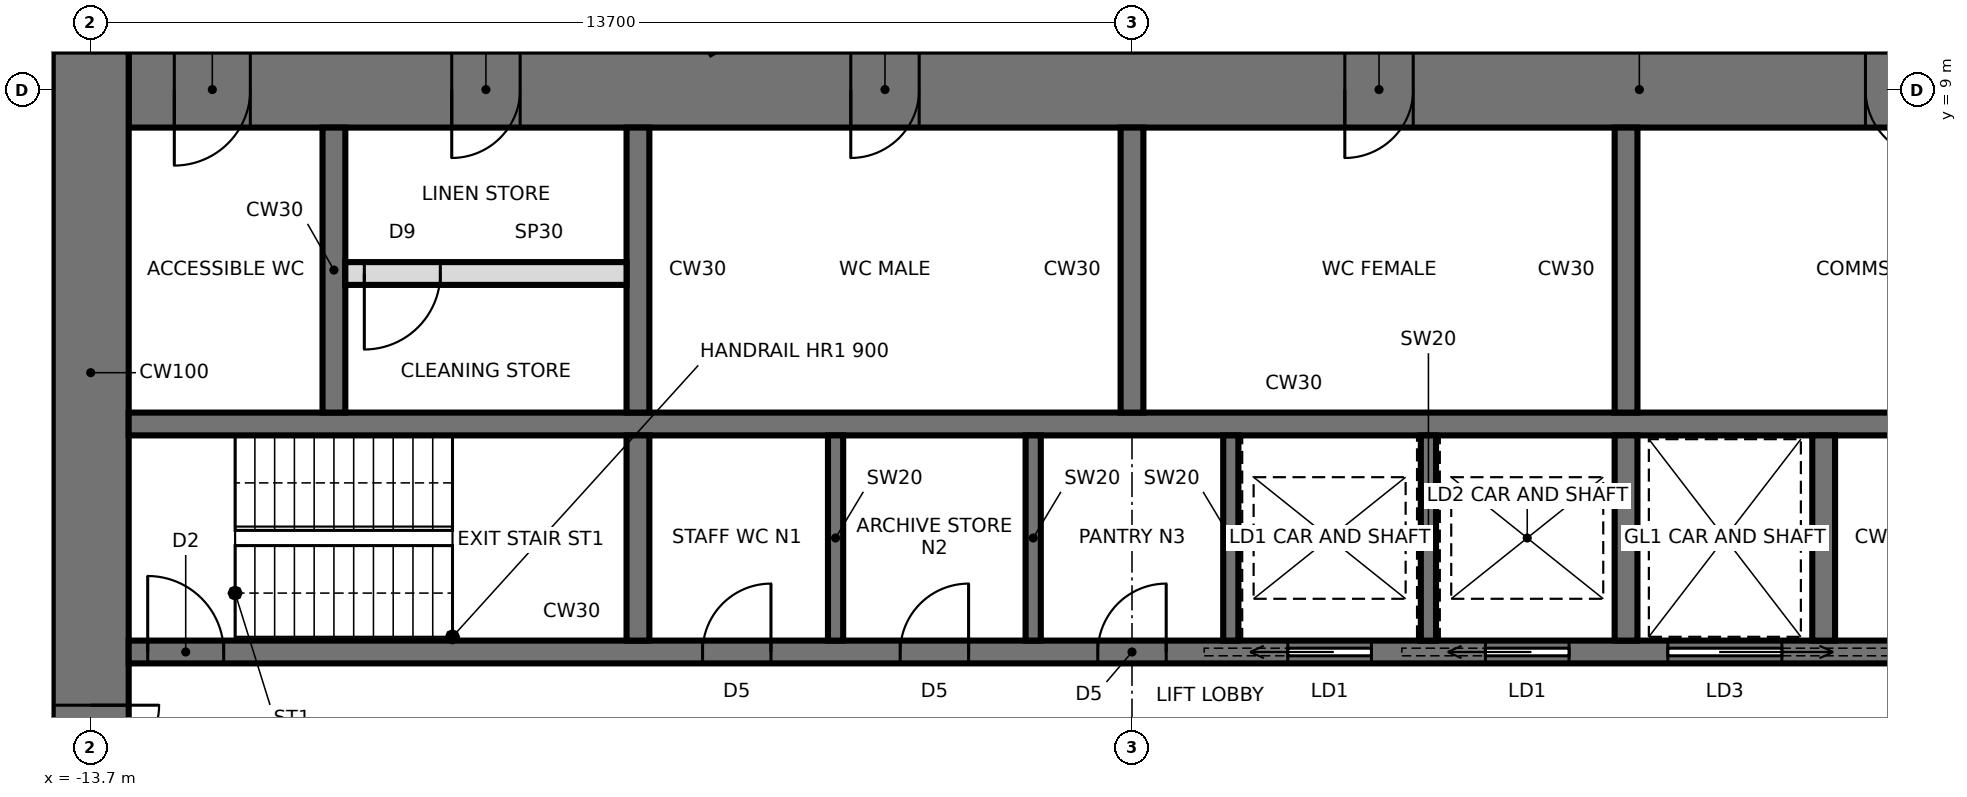
"""IFC4 building model, lengths in metres.
Left out: names, types, materials, properties, quantities, classifications, styles, units other than length and angle.
Written with IfcOpenShell. Run it as: python <this file> out.ifc"""

import sys

from ifc_helpers import new_model, si_unit, direction, frame, frame_2d, origin, place, context, subcontext, project, spatial, rectangle, extrude, element, fill, save


model = new_model("IFC4")
c1 = context("Model", 3, precision=1e-05, world=origin(), true_north=direction((0.0, 1.0)))
c2 = subcontext(c1, "Body", "Model", "MODEL_VIEW")
j1 = project(units=[si_unit("LENGTHUNIT", "METRE"), si_unit("PLANEANGLEUNIT", "RADIAN")], contexts=[c1])
p1 = place(None, origin())
s1 = spatial("IfcSite", under=j1, at=p1, CompositionType="ELEMENT")
p2 = place(p1, origin())
s2 = spatial("IfcBuilding", under=s1, at=p2, CompositionType="ELEMENT")
p3 = place(p2, frame((0.0, 0.0, 256.0)))
s3 = spatial("IfcBuildingStorey", under=s2, at=p3, CompositionType="ELEMENT", Elevation=256.0)
p4 = place(p3, frame((13.2, 9.0, 0.0), z_axis=(0.0, 0.0, 1.0), x_axis=(-1.0, 0.0, 0.0)))
e1 = element("IfcWall", 1, at=p4, inside=s3, PredefinedType="SHEAR", context=c2, shape_type="SweptSolid", body=[
    extrude(rectangle(XDim=26.4, YDim=1.0, at=frame_2d((13.2, 0.0))), origin(), (0.0, 0.0, 1.0), 4.2),
])
p5 = place(p4, frame((2.65, 0.0, 0.0)))
e2 = element("IfcOpeningElement", 2, at=p5, cuts=e1, PredefinedType="OPENING", context=c2, shape_type="SweptSolid", body=[
    extrude(rectangle(XDim=0.9, YDim=2.1, at=frame_2d((0.45, 1.05))), frame((0.0, 0.51, 0.0), z_axis=(0.0, -1.0, 0.0), x_axis=(1.0, 0.0, 0.0)), (0.0, 0.0, 1.0), 1.02),
])
p6 = place(p4, frame((9.5, 0.0, 0.0)))
e3 = element("IfcOpeningElement", 3, at=p6, cuts=e1, PredefinedType="OPENING", context=c2, shape_type="SweptSolid", body=[
    extrude(rectangle(XDim=0.9, YDim=2.1, at=frame_2d((0.45, 1.05))), frame((0.0, 0.51, 0.0), z_axis=(0.0, -1.0, 0.0), x_axis=(1.0, 0.0, 0.0)), (0.0, 0.0, 1.0), 1.02),
])
p7 = place(p4, frame((16.0, 0.0, 0.0)))
e4 = element("IfcOpeningElement", 4, at=p7, cuts=e1, PredefinedType="OPENING", context=c2, shape_type="SweptSolid", body=[
    extrude(rectangle(XDim=0.9, YDim=2.1, at=frame_2d((0.45, 1.05))), frame((0.0, 0.51, 0.0), z_axis=(0.0, -1.0, 0.0), x_axis=(1.0, 0.0, 0.0)), (0.0, 0.0, 1.0), 1.02),
])
p8 = place(p4, frame((21.25, 0.0, 0.0)))
e5 = element("IfcOpeningElement", 5, at=p8, cuts=e1, PredefinedType="OPENING", context=c2, shape_type="SweptSolid", body=[
    extrude(rectangle(XDim=0.9, YDim=2.1, at=frame_2d((0.45, 1.05))), frame((0.0, 0.51, 0.0), z_axis=(0.0, -1.0, 0.0), x_axis=(1.0, 0.0, 0.0)), (0.0, 0.0, 1.0), 1.02),
])
p9 = place(p4, frame((24.8, 0.0, 0.0)))
e6 = element("IfcOpeningElement", 6, at=p9, cuts=e1, PredefinedType="OPENING", context=c2, shape_type="SweptSolid", body=[
    extrude(rectangle(XDim=1.0, YDim=2.1, at=frame_2d((0.5, 1.05))), frame((0.0, 0.51, 0.0), z_axis=(0.0, -1.0, 0.0), x_axis=(1.0, 0.0, 0.0)), (0.0, 0.0, 1.0), 1.02),
])
p10 = place(p3, frame((-13.7, 9.5, 0.0), z_axis=(0.0, 0.0, 1.0), x_axis=(0.0, -1.0, 0.0)))
e7 = element("IfcWall", 7, at=p10, inside=s3, PredefinedType="SHEAR", context=c2, shape_type="SweptSolid", body=[
    extrude(rectangle(XDim=19.0, YDim=1.0, at=frame_2d((9.5, 0.0))), origin(), (0.0, 0.0, 1.0), 4.2),
])
p11 = place(p10, frame((8.6, 0.0, 0.0)))
e8 = element("IfcOpeningElement", 8, at=p11, cuts=e7, PredefinedType="OPENING", context=c2, shape_type="SweptSolid", body=[
    extrude(rectangle(XDim=1.8, YDim=2.4, at=frame_2d((0.9, 1.2))), frame((0.0, 0.51, 0.0), z_axis=(0.0, -1.0, 0.0), x_axis=(1.0, 0.0, 0.0)), (0.0, 0.0, 1.0), 1.02),
])
p12 = place(p3, frame((-13.2, 1.6, 0.0), z_axis=(0.0, 0.0, 1.0), x_axis=(1.0, 0.0, 0.0)))
e9 = element("IfcWall", 9, at=p12, inside=s3, PredefinedType="SHEAR", context=c2, shape_type="SweptSolid", body=[
    extrude(rectangle(XDim=26.4, YDim=0.3, at=frame_2d((13.2, 0.0))), origin(), (0.0, 0.0, 1.0), 4.2),
])
p13 = place(p12, frame((0.25, 0.0, 0.0)))
e10 = element("IfcOpeningElement", 10, at=p13, cuts=e9, PredefinedType="OPENING", context=c2, shape_type="SweptSolid", body=[
    extrude(rectangle(XDim=1.0, YDim=2.1, at=frame_2d((0.5, 1.05))), frame((0.0, 0.16, 0.0), z_axis=(0.0, -1.0, 0.0), x_axis=(1.0, 0.0, 0.0)), (0.0, 0.0, 1.0), 0.32),
])
p14 = place(p12, frame((20.25, 0.0, 0.0)))
e11 = element("IfcOpeningElement", 11, at=p14, cuts=e9, PredefinedType="OPENING", context=c2, shape_type="SweptSolid", body=[
    extrude(rectangle(XDim=1.5, YDim=2.4, at=frame_2d((0.75, 1.2))), frame((0.0, 0.16, 0.0), z_axis=(0.0, -1.0, 0.0), x_axis=(1.0, 0.0, 0.0)), (0.0, 0.0, 1.0), 0.32),
])
p15 = place(p12, frame((7.55, 0.0, 0.0)))
e12 = element("IfcOpeningElement", 12, at=p15, cuts=e9, PredefinedType="OPENING", context=c2, shape_type="SweptSolid", body=[
    extrude(rectangle(XDim=0.9, YDim=2.1, at=frame_2d((0.45, 1.05))), frame((0.0, 0.16, 0.0), z_axis=(0.0, -1.0, 0.0), x_axis=(1.0, 0.0, 0.0)), (0.0, 0.0, 1.0), 0.32),
])
p16 = place(p12, frame((10.15, 0.0, 0.0)))
e13 = element("IfcOpeningElement", 13, at=p16, cuts=e9, PredefinedType="OPENING", context=c2, shape_type="SweptSolid", body=[
    extrude(rectangle(XDim=0.9, YDim=2.1, at=frame_2d((0.45, 1.05))), frame((0.0, 0.16, 0.0), z_axis=(0.0, -1.0, 0.0), x_axis=(1.0, 0.0, 0.0)), (0.0, 0.0, 1.0), 0.32),
])
p17 = place(p12, frame((12.75, 0.0, 0.0)))
e14 = element("IfcOpeningElement", 14, at=p17, cuts=e9, PredefinedType="OPENING", context=c2, shape_type="SweptSolid", body=[
    extrude(rectangle(XDim=0.9, YDim=2.1, at=frame_2d((0.45, 1.05))), frame((0.0, 0.16, 0.0), z_axis=(0.0, -1.0, 0.0), x_axis=(1.0, 0.0, 0.0)), (0.0, 0.0, 1.0), 0.32),
])
p18 = place(p12, frame((15.25, 0.0, 0.0)))
e15 = element("IfcOpeningElement", 15, at=p18, cuts=e9, PredefinedType="OPENING", context=c2, shape_type="SweptSolid", body=[
    extrude(rectangle(XDim=1.1, YDim=2.3, at=frame_2d((0.55, 1.15))), frame((0.0, 0.16, 0.0), z_axis=(0.0, -1.0, 0.0), x_axis=(1.0, 0.0, 0.0)), (0.0, 0.0, 1.0), 0.32),
])
p19 = place(p12, frame((17.85, 0.0, 0.0)))
e16 = element("IfcOpeningElement", 16, at=p19, cuts=e9, PredefinedType="OPENING", context=c2, shape_type="SweptSolid", body=[
    extrude(rectangle(XDim=1.1, YDim=2.3, at=frame_2d((0.55, 1.15))), frame((0.0, 0.16, 0.0), z_axis=(0.0, -1.0, 0.0), x_axis=(1.0, 0.0, 0.0)), (0.0, 0.0, 1.0), 0.32),
])
p20 = place(p12, frame((24.15, 0.0, 0.0)))
e17 = element("IfcOpeningElement", 17, at=p20, cuts=e9, PredefinedType="OPENING", context=c2, shape_type="SweptSolid", body=[
    extrude(rectangle(XDim=0.9, YDim=2.1, at=frame_2d((0.45, 1.05))), frame((0.0, 0.16, 0.0), z_axis=(0.0, -1.0, 0.0), x_axis=(1.0, 0.0, 0.0)), (0.0, 0.0, 1.0), 0.32),
])
p21 = place(p3, frame((-13.2, 4.6, 0.0), z_axis=(0.0, 0.0, 1.0), x_axis=(1.0, 0.0, 0.0)))
e18 = element("IfcWall", 18, at=p21, inside=s3, PredefinedType="SHEAR", context=c2, shape_type="SweptSolid", body=[
    extrude(rectangle(XDim=26.4, YDim=0.3, at=frame_2d((13.2, 0.0))), origin(), (0.0, 0.0, 1.0), 4.2),
])
p22 = place(p3, frame((-6.5, 1.75, 0.0), z_axis=(0.0, 0.0, 1.0), x_axis=(0.0, 1.0, 0.0)))
e19 = element("IfcWall", 19, at=p22, inside=s3, PredefinedType="SHEAR", context=c2, shape_type="SweptSolid", body=[
    extrude(rectangle(XDim=2.7, YDim=0.3, at=frame_2d((1.35, 0.0))), origin(), (0.0, 0.0, 1.0), 4.2),
])
p23 = place(p3, frame((-6.5, 4.75, 0.0), z_axis=(0.0, 0.0, 1.0), x_axis=(0.0, 1.0, 0.0)))
e20 = element("IfcWall", 20, at=p23, inside=s3, PredefinedType="SHEAR", context=c2, shape_type="SweptSolid", body=[
    extrude(rectangle(XDim=3.75, YDim=0.3, at=frame_2d((1.875, 0.0))), origin(), (0.0, 0.0, 1.0), 4.2),
])
p24 = place(p3, frame((6.5, 1.75, 0.0), z_axis=(0.0, 0.0, 1.0), x_axis=(0.0, 1.0, 0.0)))
e21 = element("IfcWall", 21, at=p24, inside=s3, PredefinedType="SHEAR", context=c2, shape_type="SweptSolid", body=[
    extrude(rectangle(XDim=2.7, YDim=0.3, at=frame_2d((1.35, 0.0))), origin(), (0.0, 0.0, 1.0), 4.2),
])
p25 = place(p3, frame((6.5, 4.75, 0.0), z_axis=(0.0, 0.0, 1.0), x_axis=(0.0, 1.0, 0.0)))
e22 = element("IfcWall", 22, at=p25, inside=s3, PredefinedType="SHEAR", context=c2, shape_type="SweptSolid", body=[
    extrude(rectangle(XDim=3.75, YDim=0.3, at=frame_2d((1.875, 0.0))), origin(), (0.0, 0.0, 1.0), 4.2),
])
for number, where, z_axis, x_axis in (
    (23, (-3.9, 1.75, 0.0), (0.0, 0.0, 1.0), (0.0, 1.0, 0.0)),
    (24, (-1.3, 1.75, 0.0), (0.0, 0.0, 1.0), (0.0, 1.0, 0.0)),
    (25, (1.3, 1.75, 0.0), (0.0, 0.0, 1.0), (0.0, 1.0, 0.0)),
    (26, (3.9, 1.75, 0.0), (0.0, 0.0, 1.0), (0.0, 1.0, 0.0)),
):
    element("IfcWall", number, at=place(p3, frame(where, z_axis=z_axis, x_axis=x_axis)), inside=s3, PredefinedType="SHEAR", context=c2, shape_type="SweptSolid", body=[
        extrude(rectangle(XDim=2.7, YDim=0.2, at=frame_2d((1.35, 0.0))), origin(), (0.0, 0.0, 1.0), 4.2),
    ])
for number, where, z_axis, x_axis in (
    (27, (0.0, 4.75, 0.0), (0.0, 0.0, 1.0), (0.0, 1.0, 0.0)),
    (28, (-10.5, 4.75, 0.0), (0.0, 0.0, 1.0), (0.0, 1.0, 0.0)),
):
    element("IfcWall", number, at=place(p3, frame(where, z_axis=z_axis, x_axis=x_axis)), inside=s3, PredefinedType="SHEAR", context=c2, shape_type="SweptSolid", body=[
        extrude(rectangle(XDim=3.75, YDim=0.3, at=frame_2d((1.875, 0.0))), origin(), (0.0, 0.0, 1.0), 4.2),
    ])
p26 = place(p3, frame((9.1, 1.75, 0.0), z_axis=(0.0, 0.0, 1.0), x_axis=(0.0, 1.0, 0.0)))
e29 = element("IfcWall", 29, at=p26, inside=s3, PredefinedType="SHEAR", context=c2, shape_type="SweptSolid", body=[
    extrude(rectangle(XDim=2.7, YDim=0.3, at=frame_2d((1.35, 0.0))), origin(), (0.0, 0.0, 1.0), 4.2),
])
p27 = place(p3, frame((-10.35, 6.58, 0.0), z_axis=(0.0, 0.0, 1.0), x_axis=(1.0, 0.0, 0.0)))
e30 = element("IfcWall", 30, at=p27, inside=s3, PredefinedType="PARTITIONING", context=c2, shape_type="SweptSolid", body=[
    extrude(rectangle(XDim=3.7, YDim=0.3, at=frame_2d((1.85, 0.0))), origin(), (0.0, 0.0, 1.0), 4.04),
])
p28 = place(p27, frame((0.25, 0.0, 0.0)))
e31 = element("IfcOpeningElement", 31, at=p28, cuts=e30, PredefinedType="OPENING", context=c2, shape_type="SweptSolid", body=[
    extrude(rectangle(XDim=1.0, YDim=2.4, at=frame_2d((0.5, 1.2))), frame((0.0, 0.16, 0.0), z_axis=(0.0, -1.0, 0.0), x_axis=(1.0, 0.0, 0.0)), (0.0, 0.0, 1.0), 0.32),
])
p29 = place(p3, frame((-5.485, 9.5, 0.0), z_axis=(0.0, 0.0, 1.0), x_axis=(-0.499988999718, 0.866031754707, 0.0)))
e32 = element("IfcWall", 32, at=p29, inside=s3, PredefinedType="PARTITIONING", context=c2, shape_type="SweptSolid", body=[
    extrude(rectangle(XDim=9.092, YDim=0.12, at=frame_2d((4.546, 0.0))), origin(), (0.0, 0.0, 1.0), 4.04),
])
p30 = place(p29, frame((2.772, 0.0, 0.0)))
e33 = element("IfcOpeningElement", 33, at=p30, cuts=e32, PredefinedType="OPENING", context=c2, shape_type="SweptSolid", body=[
    extrude(rectangle(XDim=1.0, YDim=2.4, at=frame_2d((0.5, 1.2))), frame((0.0, 0.07, 0.0), z_axis=(0.0, -1.0, 0.0), x_axis=(1.0, 0.0, 0.0)), (0.0, 0.0, 1.0), 0.14),
])
p31 = place(p11, origin())
e34 = element("IfcDoor", 34, at=p31, inside=s3, OperationType="DOUBLE_DOOR_SINGLE_SWING", PredefinedType="DOOR", context=c2, shape_type="SweptSolid", body=[
    extrude(rectangle(XDim=1.72, YDim=2.36, at=frame_2d((0.9, 1.18))), frame((0.0, 0.025, 0.0), z_axis=(0.0, -1.0, 0.0), x_axis=(1.0, 0.0, 0.0)), (0.0, 0.0, 1.0), 0.05),
    extrude(rectangle(XDim=0.04, YDim=2.4, at=frame_2d((0.02, 1.2))), frame((0.0, 0.25, 0.0), z_axis=(0.0, -1.0, 0.0), x_axis=(1.0, 0.0, 0.0)), (0.0, 0.0, 1.0), 0.5),
    extrude(rectangle(XDim=0.04, YDim=2.4, at=frame_2d((1.78, 1.2))), frame((0.0, 0.25, 0.0), z_axis=(0.0, -1.0, 0.0), x_axis=(1.0, 0.0, 0.0)), (0.0, 0.0, 1.0), 0.5),
    extrude(rectangle(XDim=1.72, YDim=0.04, at=frame_2d((0.9, 2.38))), frame((0.0, 0.25, 0.0), z_axis=(0.0, -1.0, 0.0), x_axis=(1.0, 0.0, 0.0)), (0.0, 0.0, 1.0), 0.5),
])
fill(e8, e34)
p32 = place(p13, origin())
e35 = element("IfcDoor", 35, at=p32, inside=s3, OperationType="SINGLE_SWING_LEFT", PredefinedType="DOOR", context=c2, shape_type="SweptSolid", body=[
    extrude(rectangle(XDim=1.0, YDim=2.1, at=frame_2d((0.5, 1.05))), frame((0.0, 0.025, 0.0), z_axis=(0.0, -1.0, 0.0), x_axis=(1.0, 0.0, 0.0)), (0.0, 0.0, 1.0), 0.05),
])
fill(e10, e35)
p33 = place(p14, origin())
e36 = element("IfcDoor", 36, at=p33, inside=s3, OperationType="SLIDING_TO_RIGHT", PredefinedType="DOOR", context=c2, shape_type="SweptSolid", body=[
    extrude(rectangle(XDim=1.5, YDim=2.4, at=frame_2d((0.75, 1.2))), frame((0.0, 0.025, 0.0), z_axis=(0.0, -1.0, 0.0), x_axis=(1.0, 0.0, 0.0)), (0.0, 0.0, 1.0), 0.05),
])
fill(e11, e36)
p34 = place(p15, origin())
e37 = element("IfcDoor", 37, at=p34, inside=s3, OperationType="SINGLE_SWING_RIGHT", PredefinedType="DOOR", context=c2, shape_type="SweptSolid", body=[
    extrude(rectangle(XDim=0.9, YDim=2.1, at=frame_2d((0.45, 1.05))), frame((0.0, 0.025, 0.0), z_axis=(0.0, -1.0, 0.0), x_axis=(1.0, 0.0, 0.0)), (0.0, 0.0, 1.0), 0.05),
])
fill(e12, e37)
p35 = place(p16, origin())
e38 = element("IfcDoor", 38, at=p35, inside=s3, OperationType="SINGLE_SWING_RIGHT", PredefinedType="DOOR", context=c2, shape_type="SweptSolid", body=[
    extrude(rectangle(XDim=0.9, YDim=2.1, at=frame_2d((0.45, 1.05))), frame((0.0, 0.025, 0.0), z_axis=(0.0, -1.0, 0.0), x_axis=(1.0, 0.0, 0.0)), (0.0, 0.0, 1.0), 0.05),
])
fill(e13, e38)
p36 = place(p17, origin())
e39 = element("IfcDoor", 39, at=p36, inside=s3, OperationType="SINGLE_SWING_RIGHT", PredefinedType="DOOR", context=c2, shape_type="SweptSolid", body=[
    extrude(rectangle(XDim=0.9, YDim=2.1, at=frame_2d((0.45, 1.05))), frame((0.0, 0.025, 0.0), z_axis=(0.0, -1.0, 0.0), x_axis=(1.0, 0.0, 0.0)), (0.0, 0.0, 1.0), 0.05),
])
fill(e14, e39)
p37 = place(p18, origin())
e40 = element("IfcDoor", 40, at=p37, inside=s3, OperationType="SLIDING_TO_LEFT", PredefinedType="DOOR", context=c2, shape_type="SweptSolid", body=[
    extrude(rectangle(XDim=1.1, YDim=2.3, at=frame_2d((0.55, 1.15))), frame((0.0, 0.025, 0.0), z_axis=(0.0, -1.0, 0.0), x_axis=(1.0, 0.0, 0.0)), (0.0, 0.0, 1.0), 0.05),
])
fill(e15, e40)
p38 = place(p19, origin())
e41 = element("IfcDoor", 41, at=p38, inside=s3, OperationType="SLIDING_TO_LEFT", PredefinedType="DOOR", context=c2, shape_type="SweptSolid", body=[
    extrude(rectangle(XDim=1.1, YDim=2.3, at=frame_2d((0.55, 1.15))), frame((0.0, 0.025, 0.0), z_axis=(0.0, -1.0, 0.0), x_axis=(1.0, 0.0, 0.0)), (0.0, 0.0, 1.0), 0.05),
])
fill(e16, e41)
p39 = place(p5, origin())
e42 = element("IfcDoor", 42, at=p39, inside=s3, OperationType="SINGLE_SWING_LEFT", PredefinedType="DOOR", context=c2, shape_type="SweptSolid", body=[
    extrude(rectangle(XDim=0.82, YDim=2.06, at=frame_2d((0.45, 1.03))), frame((0.0, 0.025, 0.0), z_axis=(0.0, -1.0, 0.0), x_axis=(1.0, 0.0, 0.0)), (0.0, 0.0, 1.0), 0.05),
    extrude(rectangle(XDim=0.04, YDim=2.1, at=frame_2d((0.02, 1.05))), frame((0.0, 0.25, 0.0), z_axis=(0.0, -1.0, 0.0), x_axis=(1.0, 0.0, 0.0)), (0.0, 0.0, 1.0), 0.5),
    extrude(rectangle(XDim=0.04, YDim=2.1, at=frame_2d((0.88, 1.05))), frame((0.0, 0.25, 0.0), z_axis=(0.0, -1.0, 0.0), x_axis=(1.0, 0.0, 0.0)), (0.0, 0.0, 1.0), 0.5),
    extrude(rectangle(XDim=0.82, YDim=0.04, at=frame_2d((0.45, 2.08))), frame((0.0, 0.25, 0.0), z_axis=(0.0, -1.0, 0.0), x_axis=(1.0, 0.0, 0.0)), (0.0, 0.0, 1.0), 0.5),
])
fill(e2, e42)
p40 = place(p6, origin())
e43 = element("IfcDoor", 43, at=p40, inside=s3, OperationType="SINGLE_SWING_RIGHT", PredefinedType="DOOR", context=c2, shape_type="SweptSolid", body=[
    extrude(rectangle(XDim=0.82, YDim=2.06, at=frame_2d((0.45, 1.03))), frame((0.0, 0.025, 0.0), z_axis=(0.0, -1.0, 0.0), x_axis=(1.0, 0.0, 0.0)), (0.0, 0.0, 1.0), 0.05),
    extrude(rectangle(XDim=0.04, YDim=2.1, at=frame_2d((0.02, 1.05))), frame((0.0, 0.25, 0.0), z_axis=(0.0, -1.0, 0.0), x_axis=(1.0, 0.0, 0.0)), (0.0, 0.0, 1.0), 0.5),
    extrude(rectangle(XDim=0.04, YDim=2.1, at=frame_2d((0.88, 1.05))), frame((0.0, 0.25, 0.0), z_axis=(0.0, -1.0, 0.0), x_axis=(1.0, 0.0, 0.0)), (0.0, 0.0, 1.0), 0.5),
    extrude(rectangle(XDim=0.82, YDim=0.04, at=frame_2d((0.45, 2.08))), frame((0.0, 0.25, 0.0), z_axis=(0.0, -1.0, 0.0), x_axis=(1.0, 0.0, 0.0)), (0.0, 0.0, 1.0), 0.5),
])
fill(e3, e43)
p41 = place(p7, origin())
e44 = element("IfcDoor", 44, at=p41, inside=s3, OperationType="SINGLE_SWING_RIGHT", PredefinedType="DOOR", context=c2, shape_type="SweptSolid", body=[
    extrude(rectangle(XDim=0.82, YDim=2.06, at=frame_2d((0.45, 1.03))), frame((0.0, 0.025, 0.0), z_axis=(0.0, -1.0, 0.0), x_axis=(1.0, 0.0, 0.0)), (0.0, 0.0, 1.0), 0.05),
    extrude(rectangle(XDim=0.04, YDim=2.1, at=frame_2d((0.02, 1.05))), frame((0.0, 0.25, 0.0), z_axis=(0.0, -1.0, 0.0), x_axis=(1.0, 0.0, 0.0)), (0.0, 0.0, 1.0), 0.5),
    extrude(rectangle(XDim=0.04, YDim=2.1, at=frame_2d((0.88, 1.05))), frame((0.0, 0.25, 0.0), z_axis=(0.0, -1.0, 0.0), x_axis=(1.0, 0.0, 0.0)), (0.0, 0.0, 1.0), 0.5),
    extrude(rectangle(XDim=0.82, YDim=0.04, at=frame_2d((0.45, 2.08))), frame((0.0, 0.25, 0.0), z_axis=(0.0, -1.0, 0.0), x_axis=(1.0, 0.0, 0.0)), (0.0, 0.0, 1.0), 0.5),
])
fill(e4, e44)
p42 = place(p8, origin())
e45 = element("IfcDoor", 45, at=p42, inside=s3, OperationType="SINGLE_SWING_RIGHT", PredefinedType="DOOR", context=c2, shape_type="SweptSolid", body=[
    extrude(rectangle(XDim=0.82, YDim=2.06, at=frame_2d((0.45, 1.03))), frame((0.0, 0.025, 0.0), z_axis=(0.0, -1.0, 0.0), x_axis=(1.0, 0.0, 0.0)), (0.0, 0.0, 1.0), 0.05),
    extrude(rectangle(XDim=0.04, YDim=2.1, at=frame_2d((0.02, 1.05))), frame((0.0, 0.25, 0.0), z_axis=(0.0, -1.0, 0.0), x_axis=(1.0, 0.0, 0.0)), (0.0, 0.0, 1.0), 0.5),
    extrude(rectangle(XDim=0.04, YDim=2.1, at=frame_2d((0.88, 1.05))), frame((0.0, 0.25, 0.0), z_axis=(0.0, -1.0, 0.0), x_axis=(1.0, 0.0, 0.0)), (0.0, 0.0, 1.0), 0.5),
    extrude(rectangle(XDim=0.82, YDim=0.04, at=frame_2d((0.45, 2.08))), frame((0.0, 0.25, 0.0), z_axis=(0.0, -1.0, 0.0), x_axis=(1.0, 0.0, 0.0)), (0.0, 0.0, 1.0), 0.5),
])
fill(e5, e45)
p43 = place(p9, origin())
e46 = element("IfcDoor", 46, at=p43, inside=s3, OperationType="SINGLE_SWING_RIGHT", PredefinedType="DOOR", context=c2, shape_type="SweptSolid", body=[
    extrude(rectangle(XDim=0.92, YDim=2.06, at=frame_2d((0.5, 1.03))), frame((0.0, 0.025, 0.0), z_axis=(0.0, -1.0, 0.0), x_axis=(1.0, 0.0, 0.0)), (0.0, 0.0, 1.0), 0.05),
    extrude(rectangle(XDim=0.04, YDim=2.1, at=frame_2d((0.02, 1.05))), frame((0.0, 0.25, 0.0), z_axis=(0.0, -1.0, 0.0), x_axis=(1.0, 0.0, 0.0)), (0.0, 0.0, 1.0), 0.5),
    extrude(rectangle(XDim=0.04, YDim=2.1, at=frame_2d((0.98, 1.05))), frame((0.0, 0.25, 0.0), z_axis=(0.0, -1.0, 0.0), x_axis=(1.0, 0.0, 0.0)), (0.0, 0.0, 1.0), 0.5),
    extrude(rectangle(XDim=0.92, YDim=0.04, at=frame_2d((0.5, 2.08))), frame((0.0, 0.25, 0.0), z_axis=(0.0, -1.0, 0.0), x_axis=(1.0, 0.0, 0.0)), (0.0, 0.0, 1.0), 0.5),
])
fill(e6, e46)
p44 = place(p28, frame((1.0, 0.0, 0.0), z_axis=(0.0, 0.0, 1.0), x_axis=(-1.0, 0.0, 0.0)))
e47 = element("IfcDoor", 47, at=p44, inside=s3, OperationType="SINGLE_SWING_RIGHT", PredefinedType="DOOR", context=c2, shape_type="SweptSolid", body=[
    extrude(rectangle(XDim=1.0, YDim=2.4, at=frame_2d((0.5, 1.2))), frame((0.0, 0.025, 0.0), z_axis=(0.0, -1.0, 0.0), x_axis=(1.0, 0.0, 0.0)), (0.0, 0.0, 1.0), 0.05),
])
fill(e31, e47)
save(model, sys.argv[1])
